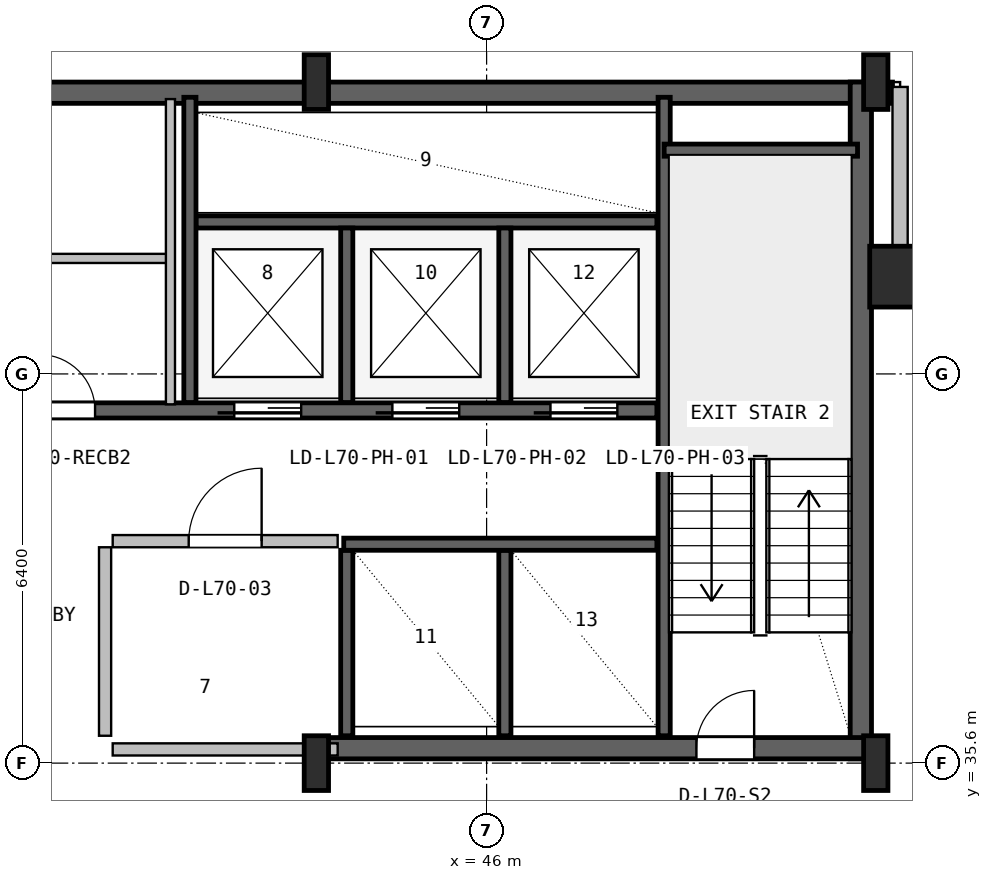
"""IFC4 building model, lengths in metres.
Left out: names, types, materials, properties, quantities, classifications, styles, units other than length and angle.
Written with IfcOpenShell. Run it as: python <this file> out.ifc"""

import sys

from ifc_helpers import new_model, si_unit, direction, frame, frame_2d, origin, origin_2d, place, context, subcontext, project, spatial, rectangle, hollow_rectangle, i_section, extrude, source, transform, mapped, element, fill, save


model = new_model("IFC4")
c1 = context("Model", 3, precision=1e-05, world=origin(), true_north=direction((0.0, 1.0)))
c2 = subcontext(c1, "Body", "Model", "MODEL_VIEW")
j1 = project(units=[si_unit("LENGTHUNIT", "METRE"), si_unit("PLANEANGLEUNIT", "RADIAN")], contexts=[c1])
p1 = place(None, origin())
s1 = spatial("IfcSite", under=j1, at=p1, CompositionType="ELEMENT")
p2 = place(p1, origin())
s2 = spatial("IfcBuilding", under=s1, at=p2, CompositionType="ELEMENT")
p3 = place(p2, frame((0.0, 0.0, 281.2)))
s3 = spatial("IfcBuildingStorey", under=s2, at=p3, CompositionType="ELEMENT", Elevation=281.2)
p4 = place(p3, frame((15.325, 46.625, 0.0), z_axis=(0.0, 0.0, 1.0), x_axis=(1.0, 0.0, 0.0)))
e1 = element("IfcWall", 1, at=p4, inside=s3, PredefinedType="SHEAR", context=c2, shape_type="SweptSolid", body=[
    extrude(rectangle(XDim=37.35, YDim=0.35, at=frame_2d((18.675, 0.0))), origin(), (0.0, 0.0, 1.0), 3.55),
])
p5 = place(p3, frame((52.155, 35.67, 0.0), z_axis=(0.0, 0.0, 1.0), x_axis=(0.0, 1.0, 0.0)))
e2 = element("IfcWall", 2, at=p5, inside=s3, PredefinedType="SHEAR", context=c2, shape_type="SweptSolid", body=[
    extrude(rectangle(XDim=11.13, YDim=0.35, at=frame_2d((5.565, 0.0))), origin(), (0.0, 0.0, 1.0), 3.55),
])
p6 = place(p3, frame((43.2, 35.845, 0.0), z_axis=(0.0, 0.0, 1.0), x_axis=(1.0, 0.0, 0.0)))
e3 = element("IfcWall", 3, at=p6, inside=s3, PredefinedType="SHEAR", context=c2, shape_type="SweptSolid", body=[
    extrude(rectangle(XDim=9.13, YDim=0.35, at=frame_2d((4.565, 0.0))), origin(), (0.0, 0.0, 1.0), 3.55),
])
p7 = place(p6, frame((6.25, 0.0, 0.0)))
e4 = element("IfcOpeningElement", 4, at=p7, cuts=e3, PredefinedType="OPENING", context=c2, shape_type="SweptSolid", body=[
    extrude(rectangle(XDim=0.95, YDim=2.1, at=frame_2d((0.475, 1.05))), frame((0.0, 0.185, 0.0), z_axis=(0.0, -1.0, 0.0), x_axis=(1.0, 0.0, 0.0)), (0.0, 0.0, 1.0), 0.37),
])
m1 = source(origin(), c2, "Body", "SweptSolid", [
    extrude(i_section(OverallWidth=0.4, OverallDepth=0.9, WebThickness=0.016, FlangeThickness=0.028, FilletRadius=0.016, at=origin_2d()), origin(), (0.0, 0.0, 1.0), 3.8),
])
for number, where, z_axis, x_axis in (
    (5, (43.2, 35.6, 0.0), (0.0, 0.0, 1.0), (1.0, 0.0, 0.0)),
    (6, (43.2, 46.8, 0.0), (0.0, 0.0, 1.0), (1.0, 0.0, 0.0)),
    (7, (52.4, 35.6, 0.0), (0.0, 0.0, 1.0), (1.0, 0.0, 0.0)),
    (8, (52.4, 46.8, 0.0), (0.0, 0.0, 1.0), (1.0, 0.0, 0.0)),
):
    element("IfcColumn", number, at=place(p3, frame(where, z_axis=z_axis, x_axis=x_axis)), inside=s3, PredefinedType="COLUMN", context=c2, shape_type="MappedRepresentation", body=[
        mapped(m1, transform((0.0, 0.0, 0.0), x_axis=(1.0, 0.0, 0.0), y_axis=(0.0, 1.0, 0.0), z_axis=(0.0, 0.0, 1.0), scale=1.0)),
    ])
m2 = source(origin(), c2, "Body", "SweptSolid", [
    extrude(hollow_rectangle(XDim=1.0, YDim=1.0, WallThickness=0.04, at=origin_2d()), origin(), (0.0, 0.0, 1.0), 3.8),
])
p8 = place(p3, frame((52.8, 43.6, 0.0), z_axis=(0.0, 0.0, 1.0), x_axis=(1.0, 0.0, 0.0)))
e9 = element("IfcColumn", 9, at=p8, inside=s3, PredefinedType="COLUMN", context=c2, shape_type="MappedRepresentation", body=[
    mapped(m2, transform((0.0, 0.0, 0.0), x_axis=(1.0, 0.0, 0.0), y_axis=(0.0, 1.0, 0.0), z_axis=(0.0, 0.0, 1.0), scale=1.0)),
])
p9 = place(p3, frame((52.93, 43.6, 0.0), z_axis=(0.0, 0.0, 1.0), x_axis=(1.0, 0.0, 0.0)))
e10 = element("IfcWall", 10, at=p9, inside=s3, PredefinedType="SOLIDWALL", context=c2, shape_type="SweptSolid", body=[
    extrude(rectangle(XDim=2.99, YDim=0.25, at=frame_2d((1.495, 0.0))), origin(), (0.0, 0.0, 1.0), 3.53),
])
p10 = place(p3, frame((52.8, 43.52, 0.0), z_axis=(0.0, 0.0, 1.0), x_axis=(0.0, 1.0, 0.0)))
e11 = element("IfcWall", 11, at=p10, inside=s3, PredefinedType="SOLIDWALL", context=c2, shape_type="SweptSolid", body=[
    extrude(rectangle(XDim=3.2, YDim=0.25, at=frame_2d((1.6, 0.0))), origin(), (0.0, 0.0, 1.0), 3.171),
])
p11 = place(p3, frame((48.92, 36.05, 0.0), z_axis=(0.0, 0.0, 1.0), x_axis=(0.0, 1.0, 0.0)))
e12 = element("IfcWall", 12, at=p11, inside=s3, PredefinedType="SHEAR", context=c2, shape_type="SweptSolid", body=[
    extrude(rectangle(XDim=10.5, YDim=0.2, at=frame_2d((5.25, 0.0))), origin(), (0.0, 0.0, 1.0), 3.55),
])
p12 = place(p3, frame((48.92, 45.68, 0.0), z_axis=(0.0, 0.0, 1.0), x_axis=(1.0, 0.0, 0.0)))
e13 = element("IfcWall", 13, at=p12, inside=s3, PredefinedType="SHEAR", context=c2, shape_type="SweptSolid", body=[
    extrude(rectangle(XDim=3.18, YDim=0.2, at=frame_2d((1.59, 0.0))), origin(), (0.0, 0.0, 1.0), 3.55),
])
p13 = place(p3, frame((24.98, 41.4, 0.0), z_axis=(0.0, 0.0, 1.0), x_axis=(1.0, 0.0, 0.0)))
e14 = element("IfcWall", 14, at=p13, inside=s3, PredefinedType="SHEAR", context=c2, shape_type="SweptSolid", body=[
    extrude(rectangle(XDim=23.82, YDim=0.25, at=frame_2d((11.91, 0.0))), origin(), (0.0, 0.0, 1.0), 3.55),
])
p14 = place(p13, frame((16.87, 0.0, 0.0)))
e15 = element("IfcOpeningElement", 15, at=p14, cuts=e14, PredefinedType="OPENING", context=c2, shape_type="SweptSolid", body=[
    extrude(rectangle(XDim=1.1, YDim=2.18, at=frame_2d((0.55, 1.09))), frame((0.0, 0.135, 0.0), z_axis=(0.0, -1.0, 0.0), x_axis=(1.0, 0.0, 0.0)), (0.0, 0.0, 1.0), 0.27),
])
p15 = place(p13, frame((19.47, 0.0, 0.0)))
e16 = element("IfcOpeningElement", 16, at=p15, cuts=e14, PredefinedType="OPENING", context=c2, shape_type="SweptSolid", body=[
    extrude(rectangle(XDim=1.1, YDim=2.18, at=frame_2d((0.55, 1.09))), frame((0.0, 0.135, 0.0), z_axis=(0.0, -1.0, 0.0), x_axis=(1.0, 0.0, 0.0)), (0.0, 0.0, 1.0), 0.27),
])
p16 = place(p13, frame((22.07, 0.0, 0.0)))
e17 = element("IfcOpeningElement", 17, at=p16, cuts=e14, PredefinedType="OPENING", context=c2, shape_type="SweptSolid", body=[
    extrude(rectangle(XDim=1.1, YDim=2.18, at=frame_2d((0.55, 1.09))), frame((0.0, 0.135, 0.0), z_axis=(0.0, -1.0, 0.0), x_axis=(1.0, 0.0, 0.0)), (0.0, 0.0, 1.0), 0.27),
])
p17 = place(p13, frame((3.56, 0.0, 0.0)))
e18 = element("IfcOpeningElement", 18, at=p17, cuts=e14, PredefinedType="OPENING", context=c2, shape_type="SweptSolid", body=[
    extrude(rectangle(XDim=1.0, YDim=2.08, at=frame_2d((0.5, 1.04))), frame((0.0, 0.135, 0.0), z_axis=(0.0, -1.0, 0.0), x_axis=(1.0, 0.0, 0.0)), (0.0, 0.0, 1.0), 0.27),
])
p18 = place(p13, frame((9.76, 0.0, 0.0)))
e19 = element("IfcOpeningElement", 19, at=p18, cuts=e14, PredefinedType="OPENING", context=c2, shape_type="SweptSolid", body=[
    extrude(rectangle(XDim=0.92, YDim=2.08, at=frame_2d((0.46, 1.04))), frame((0.0, 0.135, 0.0), z_axis=(0.0, -1.0, 0.0), x_axis=(1.0, 0.0, 0.0)), (0.0, 0.0, 1.0), 0.27),
])
p19 = place(p13, frame((13.66, 0.0, 0.0)))
e20 = element("IfcOpeningElement", 20, at=p19, cuts=e14, PredefinedType="OPENING", context=c2, shape_type="SweptSolid", body=[
    extrude(rectangle(XDim=0.92, YDim=2.08, at=frame_2d((0.46, 1.04))), frame((0.0, 0.135, 0.0), z_axis=(0.0, -1.0, 0.0), x_axis=(1.0, 0.0, 0.0)), (0.0, 0.0, 1.0), 0.27),
])
p20 = place(p3, frame((41.22, 44.5, 0.0), z_axis=(0.0, 0.0, 1.0), x_axis=(1.0, 0.0, 0.0)))
e21 = element("IfcWall", 21, at=p20, inside=s3, PredefinedType="SHEAR", context=c2, shape_type="SweptSolid", body=[
    extrude(rectangle(XDim=7.58, YDim=0.2, at=frame_2d((3.79, 0.0))), origin(), (0.0, 0.0, 1.0), 3.55),
])
p21 = place(p3, frame((41.12, 41.53, 0.0), z_axis=(0.0, 0.0, 1.0), x_axis=(0.0, 1.0, 0.0)))
e22 = element("IfcWall", 22, at=p21, inside=s3, PredefinedType="SHEAR", context=c2, shape_type="SweptSolid", body=[
    extrude(rectangle(XDim=5.02, YDim=0.2, at=frame_2d((2.51, 0.0))), origin(), (0.0, 0.0, 1.0), 3.55),
])
for number, where, z_axis, x_axis in (
    (23, (43.7, 41.53, 0.0), (0.0, 0.0, 1.0), (0.0, 1.0, 0.0)),
    (24, (46.3, 41.53, 0.0), (0.0, 0.0, 1.0), (0.0, 1.0, 0.0)),
):
    element("IfcWall", number, at=place(p3, frame(where, z_axis=z_axis, x_axis=x_axis)), inside=s3, PredefinedType="SHEAR", context=c2, shape_type="SweptSolid", body=[
        extrude(rectangle(XDim=2.87, YDim=0.2, at=frame_2d((1.435, 0.0))), origin(), (0.0, 0.0, 1.0), 3.55),
    ])
for number, where, z_axis, x_axis in (
    (25, (43.7, 36.05, 0.0), (0.0, 0.0, 1.0), (0.0, 1.0, 0.0)),
    (26, (46.3, 36.05, 0.0), (0.0, 0.0, 1.0), (0.0, 1.0, 0.0)),
):
    element("IfcWall", number, at=place(p3, frame(where, z_axis=z_axis, x_axis=x_axis)), inside=s3, PredefinedType="SHEAR", context=c2, shape_type="SweptSolid", body=[
        extrude(rectangle(XDim=3.05, YDim=0.2, at=frame_2d((1.525, 0.0))), origin(), (0.0, 0.0, 1.0), 3.55),
    ])
p22 = place(p3, frame((43.65, 39.2, 0.0), z_axis=(0.0, 0.0, 1.0), x_axis=(1.0, 0.0, 0.0)))
e27 = element("IfcWall", 27, at=p22, inside=s3, PredefinedType="SHEAR", context=c2, shape_type="SweptSolid", body=[
    extrude(rectangle(XDim=5.15, YDim=0.2, at=frame_2d((2.575, 0.0))), origin(), (0.0, 0.0, 1.0), 3.55),
])
p23 = place(p3, frame((39.85, 35.825, 0.0), z_axis=(0.0, 0.0, 1.0), x_axis=(1.0, 0.0, 0.0)))
e28 = element("IfcWall", 28, at=p23, inside=s3, PredefinedType="SOLIDWALL", context=c2, shape_type="SweptSolid", body=[
    extrude(rectangle(XDim=3.7, YDim=0.2, at=frame_2d((1.85, 0.0))), origin(), (0.0, 0.0, 1.0), 2.575),
])
p24 = place(p3, frame((39.85, 39.25, 0.0), z_axis=(0.0, 0.0, 1.0), x_axis=(1.0, 0.0, 0.0)))
e29 = element("IfcWall", 29, at=p24, inside=s3, PredefinedType="SOLIDWALL", context=c2, shape_type="SweptSolid", body=[
    extrude(rectangle(XDim=3.7, YDim=0.2, at=frame_2d((1.85, 0.0))), origin(), (0.0, 0.0, 1.0), 3.53),
])
p25 = place(p24, frame((1.25, 0.0, 0.0)))
e30 = element("IfcOpeningElement", 30, at=p25, cuts=e29, PredefinedType="OPENING", context=c2, shape_type="SweptSolid", body=[
    extrude(rectangle(XDim=1.2, YDim=2.1, at=frame_2d((0.6, 1.05))), frame((0.0, 0.11, 0.0), z_axis=(0.0, -1.0, 0.0), x_axis=(1.0, 0.0, 0.0)), (0.0, 0.0, 1.0), 0.22),
])
p26 = place(p3, frame((39.725, 36.05, 0.0), z_axis=(0.0, 0.0, 1.0), x_axis=(0.0, 1.0, 0.0)))
e31 = element("IfcWall", 31, at=p26, inside=s3, PredefinedType="SOLIDWALL", context=c2, shape_type="SweptSolid", body=[
    extrude(rectangle(XDim=3.1, YDim=0.2, at=frame_2d((1.55, 0.0))), origin(), (0.0, 0.0, 1.0), 3.53),
])
p27 = place(p3, frame((37.2, 43.9, 0.0), z_axis=(0.0, 0.0, 1.0), x_axis=(1.0, 0.0, 0.0)))
e32 = element("IfcWall", 32, at=p27, inside=s3, PredefinedType="PARTITIONING", context=c2, shape_type="SweptSolid", body=[
    extrude(rectangle(XDim=3.6, YDim=0.15, at=frame_2d((1.8, 0.0))), origin(), (0.0, 0.0, 1.0), 3.53),
])
p28 = place(p3, frame((40.8, 41.5, 0.0), z_axis=(0.0, 0.0, 1.0), x_axis=(0.0, 1.0, 0.0)))
e33 = element("IfcWall", 33, at=p28, inside=s3, PredefinedType="PARTITIONING", context=c2, shape_type="SweptSolid", body=[
    extrude(rectangle(XDim=5.02, YDim=0.15, at=frame_2d((2.51, 0.0))), origin(), (0.0, 0.0, 1.0), 3.53),
])
m3 = source(origin(), c2, "Body", "SweptSolid", [
    extrude(rectangle(XDim=0.95, YDim=2.1, at=frame_2d((0.475, 1.05))), frame((0.0, 0.025, 0.0), z_axis=(0.0, -1.0, 0.0), x_axis=(1.0, 0.0, 0.0)), (0.0, 0.0, 1.0), 0.05),
])
p29 = place(p7, origin())
e34 = element("IfcDoor", 34, at=p29, inside=s3, OperationType="SINGLE_SWING_RIGHT", PredefinedType="DOOR", context=c2, shape_type="MappedRepresentation", body=[
    mapped(m3, transform((0.0, 0.0, 0.0), x_axis=(1.0, 0.0, 0.0), y_axis=(0.0, 1.0, 0.0), z_axis=(0.0, 0.0, 1.0), scale=1.0)),
])
fill(e4, e34)
m4 = source(origin(), c2, "Body", "SweptSolid", [
    extrude(rectangle(XDim=1.1, YDim=2.18, at=frame_2d((0.55, 1.09))), frame((0.0, 0.025, 0.0), z_axis=(0.0, -1.0, 0.0), x_axis=(1.0, 0.0, 0.0)), (0.0, 0.0, 1.0), 0.05),
])
p30 = place(p14, frame((1.1, 0.0, 0.0), z_axis=(0.0, 0.0, 1.0), x_axis=(-1.0, 0.0, 0.0)))
e35 = element("IfcDoor", 35, at=p30, inside=s3, OperationType="SLIDING_TO_LEFT", PredefinedType="DOOR", context=c2, shape_type="MappedRepresentation", body=[
    mapped(m4, transform((0.0, 0.0, 0.0), x_axis=(1.0, 0.0, 0.0), y_axis=(0.0, 1.0, 0.0), z_axis=(0.0, 0.0, 1.0), scale=1.0)),
])
fill(e15, e35)
p31 = place(p15, frame((1.1, 0.0, 0.0), z_axis=(0.0, 0.0, 1.0), x_axis=(-1.0, 0.0, 0.0)))
e36 = element("IfcDoor", 36, at=p31, inside=s3, OperationType="SLIDING_TO_LEFT", PredefinedType="DOOR", context=c2, shape_type="MappedRepresentation", body=[
    mapped(m4, transform((0.0, 0.0, 0.0), x_axis=(1.0, 0.0, 0.0), y_axis=(0.0, 1.0, 0.0), z_axis=(0.0, 0.0, 1.0), scale=1.0)),
])
fill(e16, e36)
p32 = place(p16, frame((1.1, 0.0, 0.0), z_axis=(0.0, 0.0, 1.0), x_axis=(-1.0, 0.0, 0.0)))
e37 = element("IfcDoor", 37, at=p32, inside=s3, OperationType="SLIDING_TO_LEFT", PredefinedType="DOOR", context=c2, shape_type="MappedRepresentation", body=[
    mapped(m4, transform((0.0, 0.0, 0.0), x_axis=(1.0, 0.0, 0.0), y_axis=(0.0, 1.0, 0.0), z_axis=(0.0, 0.0, 1.0), scale=1.0)),
])
fill(e17, e37)
m5 = source(origin(), c2, "Body", "SweptSolid", [
    extrude(rectangle(XDim=0.92, YDim=2.08, at=frame_2d((0.46, 1.04))), frame((0.0, 0.025, 0.0), z_axis=(0.0, -1.0, 0.0), x_axis=(1.0, 0.0, 0.0)), (0.0, 0.0, 1.0), 0.05),
])
p33 = place(p19, origin())
e38 = element("IfcDoor", 38, at=p33, inside=s3, OperationType="SINGLE_SWING_LEFT", PredefinedType="DOOR", context=c2, shape_type="MappedRepresentation", body=[
    mapped(m5, transform((0.0, 0.0, 0.0), x_axis=(1.0, 0.0, 0.0), y_axis=(0.0, 1.0, 0.0), z_axis=(0.0, 0.0, 1.0), scale=1.0)),
])
fill(e20, e38)
m6 = source(origin(), c2, "Body", "SweptSolid", [
    extrude(rectangle(XDim=1.2, YDim=2.1, at=frame_2d((0.6, 1.05))), frame((0.0, 0.025, 0.0), z_axis=(0.0, -1.0, 0.0), x_axis=(1.0, 0.0, 0.0)), (0.0, 0.0, 1.0), 0.05),
])
p34 = place(p25, origin())
e39 = element("IfcDoor", 39, at=p34, inside=s3, OperationType="SINGLE_SWING_RIGHT", PredefinedType="DOOR", context=c2, shape_type="MappedRepresentation", body=[
    mapped(m6, transform((0.0, 0.0, 0.0), x_axis=(1.0, 0.0, 0.0), y_axis=(0.0, 1.0, 0.0), z_axis=(0.0, 0.0, 1.0), scale=1.0)),
])
fill(e30, e39)
save(model, sys.argv[1])
